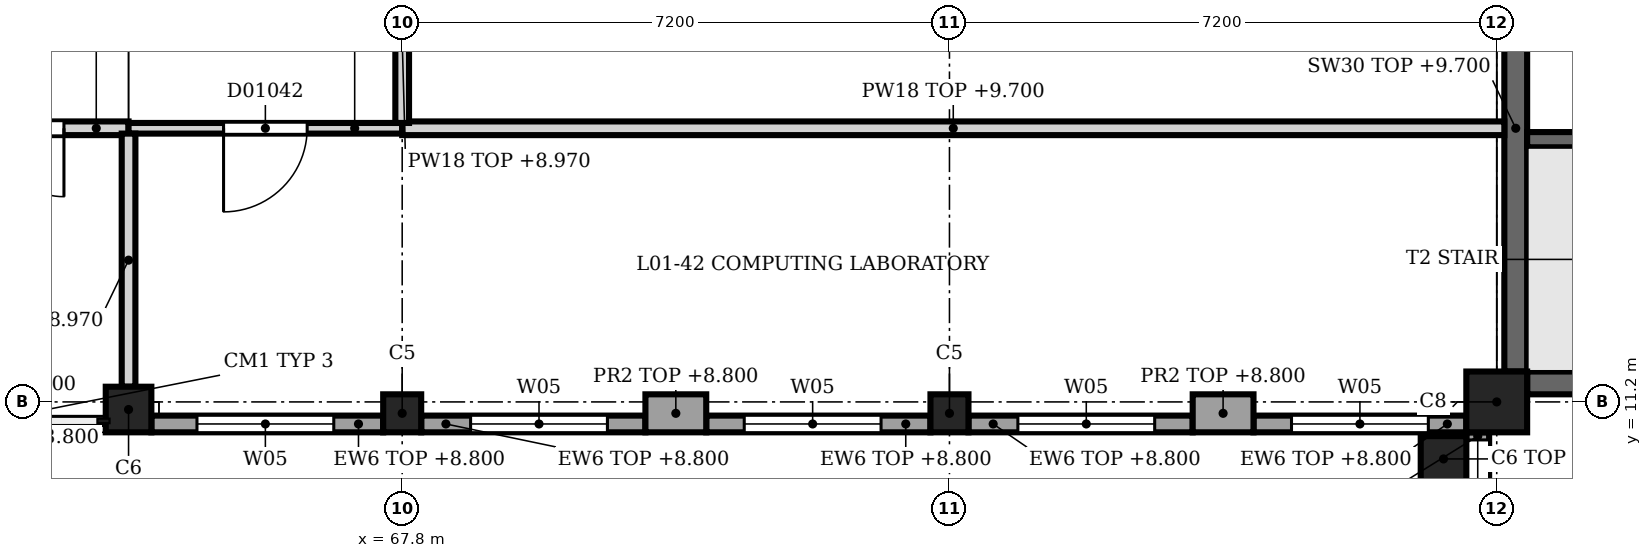
"""IFC4 building model, lengths in metres.
Left out: names, types, materials, properties, quantities, classifications, styles, units other than length and angle.
Written with IfcOpenShell. Run it as: python <this file> out.ifc"""

import sys

from ifc_helpers import new_model, si_unit, direction, frame, frame_2d, origin, origin_2d, place, context, subcontext, project, spatial, rectangle, extrude, element, fill, save


model = new_model("IFC4")
c1 = context("Model", 3, precision=1e-05, world=origin(), true_north=direction((0.0, 1.0)))
c2 = subcontext(c1, "Body", "Model", "MODEL_VIEW")
j1 = project(units=[si_unit("LENGTHUNIT", "METRE"), si_unit("PLANEANGLEUNIT", "RADIAN")], contexts=[c1])
p1 = place(None, origin())
s1 = spatial("IfcSite", under=j1, at=p1, CompositionType="ELEMENT")
p2 = place(p1, origin())
s2 = spatial("IfcBuilding", under=s1, at=p2, CompositionType="ELEMENT")
p3 = place(p2, frame((0.0, 0.0, 5.4)))
s3 = spatial("IfcBuildingStorey", under=s2, at=p3, CompositionType="ELEMENT", Elevation=5.4)
p4 = place(p3, frame((82.2, 11.2, 0.0), z_axis=(0.0, 0.0, 1.0), x_axis=(1.0, 0.0, 0.0)))
e1 = element("IfcColumn", 1, at=p4, inside=s3, PredefinedType="COLUMN", context=c2, shape_type="SweptSolid", body=[
    extrude(rectangle(XDim=0.8, YDim=0.8, at=origin_2d()), origin(), (0.0, 0.0, 1.0), 4.5),
])
p5 = place(p3, frame((64.2, 11.1, 0.0), z_axis=(0.0, 0.0, 1.0), x_axis=(1.0, 0.0, 0.0)))
e2 = element("IfcColumn", 2, at=p5, inside=s3, PredefinedType="COLUMN", context=c2, shape_type="SweptSolid", body=[
    extrude(rectangle(XDim=0.6, YDim=0.6, at=origin_2d()), origin(), (0.0, 0.0, 1.0), 4.5),
])
for number, where, z_axis, x_axis in (
    (3, (67.8, 11.05, 0.0), (0.0, 0.0, 1.0), (1.0, 0.0, 0.0)),
    (4, (75.0, 11.05, 0.0), (0.0, 0.0, 1.0), (1.0, 0.0, 0.0)),
):
    element("IfcColumn", number, at=place(p3, frame(where, z_axis=z_axis, x_axis=x_axis)), inside=s3, PredefinedType="COLUMN", context=c2, shape_type="SweptSolid", body=[
        extrude(rectangle(XDim=0.5, YDim=0.5, at=origin_2d()), origin(), (0.0, 0.0, 1.0), 4.5),
    ])
p6 = place(p3, frame((81.5, 10.45, 0.0), z_axis=(0.0, 0.0, 1.0), x_axis=(1.0, 0.0, 0.0)))
e5 = element("IfcColumn", 5, at=p6, inside=s3, PredefinedType="COLUMN", context=c2, shape_type="SweptSolid", body=[
    extrude(rectangle(XDim=0.6, YDim=0.6, at=origin_2d()), origin(), (0.0, 0.0, 1.0), 4.64),
])
p7 = place(p3, frame((81.95, 8.0, 0.0), z_axis=(0.0, 0.0, 1.0), x_axis=(0.0, 1.0, 0.0)))
e6 = element("IfcWall", 6, at=p7, inside=s3, PredefinedType="SOLIDWALL", context=c2, shape_type="SweptSolid", body=[
    extrude(rectangle(XDim=2.8, YDim=0.3, at=frame_2d((1.4, 0.0))), origin(), (0.0, 0.0, 1.0), 3.4),
])
p8 = place(p7, frame((0.1, 0.0, 0.9)))
e7 = element("IfcOpeningElement", 7, at=p8, cuts=e6, PredefinedType="OPENING", context=c2, shape_type="SweptSolid", body=[
    extrude(rectangle(XDim=2.6, YDim=2.4, at=frame_2d((1.3, 1.2))), frame((0.0, 0.16, 0.0), z_axis=(0.0, -1.0, 0.0), x_axis=(1.0, 0.0, 0.0)), (0.0, 0.0, 1.0), 0.32),
])
for number, where, z_axis, x_axis in (
    (8, (79.0, 11.05, 0.0), (0.0, 0.0, 1.0), (-1.0, 0.0, 0.0)),
    (9, (71.8, 11.05, 0.0), (0.0, 0.0, 1.0), (-1.0, 0.0, 0.0)),
):
    element("IfcWall", number, at=place(p3, frame(where, z_axis=z_axis, x_axis=x_axis)), inside=s3, PredefinedType="SOLIDWALL", context=c2, shape_type="SweptSolid", body=[
        extrude(rectangle(XDim=0.8, YDim=0.5, at=frame_2d((0.4, 0.0))), origin(), (0.0, 0.0, 1.0), 3.4),
    ])
p9 = place(p3, frame((81.8, 10.91, 0.0), z_axis=(0.0, 0.0, 1.0), x_axis=(-1.0, 0.0, 0.0)))
e10 = element("IfcWall", 10, at=p9, inside=s3, PredefinedType="SOLIDWALL", context=c2, shape_type="SweptSolid", body=[
    extrude(rectangle(XDim=2.8, YDim=0.22, at=frame_2d((1.4, 0.0))), origin(), (0.0, 0.0, 1.0), 3.4),
])
p10 = place(p9, frame((0.5, 0.0, 0.9)))
e11 = element("IfcOpeningElement", 11, at=p10, cuts=e10, PredefinedType="OPENING", context=c2, shape_type="SweptSolid", body=[
    extrude(rectangle(XDim=1.8, YDim=2.4, at=frame_2d((0.9, 1.2))), frame((0.0, 0.12, 0.0), z_axis=(0.0, -1.0, 0.0), x_axis=(1.0, 0.0, 0.0)), (0.0, 0.0, 1.0), 0.24),
])
p11 = place(p3, frame((78.2, 10.91, 0.0), z_axis=(0.0, 0.0, 1.0), x_axis=(-1.0, 0.0, 0.0)))
e12 = element("IfcWall", 12, at=p11, inside=s3, PredefinedType="SOLIDWALL", context=c2, shape_type="SweptSolid", body=[
    extrude(rectangle(XDim=2.95, YDim=0.22, at=frame_2d((1.475, 0.0))), origin(), (0.0, 0.0, 1.0), 3.4),
])
p12 = place(p11, frame((0.5, 0.0, 0.9)))
e13 = element("IfcOpeningElement", 13, at=p12, cuts=e12, PredefinedType="OPENING", context=c2, shape_type="SweptSolid", body=[
    extrude(rectangle(XDim=1.8, YDim=2.4, at=frame_2d((0.9, 1.2))), frame((0.0, 0.12, 0.0), z_axis=(0.0, -1.0, 0.0), x_axis=(1.0, 0.0, 0.0)), (0.0, 0.0, 1.0), 0.24),
])
p13 = place(p3, frame((74.75, 10.91, 0.0), z_axis=(0.0, 0.0, 1.0), x_axis=(-1.0, 0.0, 0.0)))
e14 = element("IfcWall", 14, at=p13, inside=s3, PredefinedType="SOLIDWALL", context=c2, shape_type="SweptSolid", body=[
    extrude(rectangle(XDim=2.95, YDim=0.22, at=frame_2d((1.475, 0.0))), origin(), (0.0, 0.0, 1.0), 3.4),
])
p14 = place(p13, frame((0.65, 0.0, 0.9)))
e15 = element("IfcOpeningElement", 15, at=p14, cuts=e14, PredefinedType="OPENING", context=c2, shape_type="SweptSolid", body=[
    extrude(rectangle(XDim=1.8, YDim=2.4, at=frame_2d((0.9, 1.2))), frame((0.0, 0.12, 0.0), z_axis=(0.0, -1.0, 0.0), x_axis=(1.0, 0.0, 0.0)), (0.0, 0.0, 1.0), 0.24),
])
p15 = place(p3, frame((71.0, 10.91, 0.0), z_axis=(0.0, 0.0, 1.0), x_axis=(-1.0, 0.0, 0.0)))
e16 = element("IfcWall", 16, at=p15, inside=s3, PredefinedType="SOLIDWALL", context=c2, shape_type="SweptSolid", body=[
    extrude(rectangle(XDim=2.95, YDim=0.22, at=frame_2d((1.475, 0.0))), origin(), (0.0, 0.0, 1.0), 3.4),
])
p16 = place(p15, frame((0.5, 0.0, 0.9)))
e17 = element("IfcOpeningElement", 17, at=p16, cuts=e16, PredefinedType="OPENING", context=c2, shape_type="SweptSolid", body=[
    extrude(rectangle(XDim=1.8, YDim=2.4, at=frame_2d((0.9, 1.2))), frame((0.0, 0.12, 0.0), z_axis=(0.0, -1.0, 0.0), x_axis=(1.0, 0.0, 0.0)), (0.0, 0.0, 1.0), 0.24),
])
p17 = place(p3, frame((67.55, 10.91, 0.0), z_axis=(0.0, 0.0, 1.0), x_axis=(-1.0, 0.0, 0.0)))
e18 = element("IfcWall", 18, at=p17, inside=s3, PredefinedType="SOLIDWALL", context=c2, shape_type="SweptSolid", body=[
    extrude(rectangle(XDim=3.05, YDim=0.22, at=frame_2d((1.525, 0.0))), origin(), (0.0, 0.0, 1.0), 3.4),
])
p18 = place(p17, frame((0.65, 0.0, 0.9)))
e19 = element("IfcOpeningElement", 19, at=p18, cuts=e18, PredefinedType="OPENING", context=c2, shape_type="SweptSolid", body=[
    extrude(rectangle(XDim=1.8, YDim=2.4, at=frame_2d((0.9, 1.2))), frame((0.0, 0.12, 0.0), z_axis=(0.0, -1.0, 0.0), x_axis=(1.0, 0.0, 0.0)), (0.0, 0.0, 1.0), 0.24),
])
for number, where, z_axis, x_axis in (
    (20, (82.45, 11.6, 0.0), (0.0, 0.0, 1.0), (0.0, 1.0, 0.0)),
    (21, (82.6, 11.45, 0.0), (0.0, 0.0, 1.0), (1.0, 0.0, 0.0)),
):
    element("IfcWall", number, at=place(p3, frame(where, z_axis=z_axis, x_axis=x_axis)), inside=s3, PredefinedType="SHEAR", context=c2, shape_type="SweptSolid", body=[
        extrude(rectangle(XDim=6.4, YDim=0.3, at=frame_2d((3.2, 0.0))), origin(), (0.0, 0.0, 1.0), 4.3),
    ])
p19 = place(p3, frame((89.0, 14.65, 0.0), z_axis=(0.0, 0.0, 1.0), x_axis=(-1.0, 0.0, 0.0)))
e22 = element("IfcWall", 22, at=p19, inside=s3, PredefinedType="SHEAR", context=c2, shape_type="SweptSolid", body=[
    extrude(rectangle(XDim=6.4, YDim=0.2, at=frame_2d((3.2, 0.0))), origin(), (0.0, 0.0, 1.0), 4.3),
])
p20 = place(p19, frame((0.1, 0.0, 0.0)))
e23 = element("IfcOpeningElement", 23, at=p20, cuts=e22, PredefinedType="OPENING", context=c2, shape_type="SweptSolid", body=[
    extrude(rectangle(XDim=1.0, YDim=2.1, at=frame_2d((0.5, 1.05))), frame((0.0, 0.11, 0.0), z_axis=(0.0, -1.0, 0.0), x_axis=(1.0, 0.0, 0.0)), (0.0, 0.0, 1.0), 0.22),
])
p21 = place(p3, frame((61.225, 14.8, 0.0), z_axis=(0.0, 0.0, 1.0), x_axis=(1.0, 0.0, 0.0)))
e24 = element("IfcWall", 24, at=p21, inside=s3, PredefinedType="PARTITIONING", context=c2, shape_type="SweptSolid", body=[
    extrude(rectangle(XDim=2.975, YDim=0.18, at=frame_2d((1.487, 0.0))), origin(), (0.0, 0.0, 1.0), 4.3),
])
p22 = place(p21, frame((0.325, 0.0, 0.0)))
e25 = element("IfcOpeningElement", 25, at=p22, cuts=e24, PredefinedType="OPENING", context=c2, shape_type="SweptSolid", body=[
    extrude(rectangle(XDim=1.8, YDim=2.3, at=frame_2d((0.9, 1.15))), frame((0.0, 0.1, 0.0), z_axis=(0.0, -1.0, 0.0), x_axis=(1.0, 0.0, 0.0)), (0.0, 0.0, 1.0), 0.2),
])
p23 = place(p3, frame((67.8, 14.8, 0.0), z_axis=(0.0, 0.0, 1.0), x_axis=(-1.0, 0.0, 0.0)))
e26 = element("IfcWall", 26, at=p23, inside=s3, PredefinedType="PARTITIONING", context=c2, shape_type="SweptSolid", body=[
    extrude(rectangle(XDim=3.6, YDim=0.14, at=frame_2d((1.8, 0.0))), origin(), (0.0, 0.0, 1.0), 4.3),
])
p24 = place(p23, frame((1.25, 0.0, 0.0)))
e27 = element("IfcOpeningElement", 27, at=p24, cuts=e26, PredefinedType="OPENING", context=c2, shape_type="SweptSolid", body=[
    extrude(rectangle(XDim=1.1, YDim=2.2, at=frame_2d((0.55, 1.1))), frame((0.0, 0.08, 0.0), z_axis=(0.0, -1.0, 0.0), x_axis=(1.0, 0.0, 0.0)), (0.0, 0.0, 1.0), 0.16),
])
p25 = place(p3, frame((67.8, 14.8, 0.0), z_axis=(0.0, 0.0, 1.0), x_axis=(1.0, 0.0, 0.0)))
e28 = element("IfcWall", 28, at=p25, inside=s3, PredefinedType="PARTITIONING", context=c2, shape_type="SweptSolid", body=[
    extrude(rectangle(XDim=14.5, YDim=0.18, at=frame_2d((7.25, 0.0))), origin(), (0.0, 0.0, 1.0), 4.3),
])
p26 = place(p3, frame((64.2, 11.4, 0.0), z_axis=(0.0, 0.0, 1.0), x_axis=(0.0, 1.0, 0.0)))
e29 = element("IfcWall", 29, at=p26, inside=s3, PredefinedType="PARTITIONING", context=c2, shape_type="SweptSolid", body=[
    extrude(rectangle(XDim=3.33, YDim=0.18, at=frame_2d((1.665, 0.0))), origin(), (0.0, 0.0, 1.0), 3.57),
])
p27 = place(p3, frame((67.8, 18.15, 0.0), z_axis=(0.0, 0.0, 1.0), x_axis=(0.0, -1.0, 0.0)))
e30 = element("IfcWall", 30, at=p27, inside=s3, PredefinedType="PARTITIONING", context=c2, shape_type="SweptSolid", body=[
    extrude(rectangle(XDim=3.28, YDim=0.18, at=frame_2d((1.64, 0.0))), origin(), (0.0, 0.0, 1.0), 3.57),
])
p28 = place(p27, origin())
e31 = element("IfcOpeningElement", 31, at=p28, cuts=e30, PredefinedType="OPENING", context=c2, shape_type="SweptSolid", body=[
    extrude(rectangle(XDim=1.1, YDim=2.3, at=frame_2d((0.55, 1.15))), frame((0.0, 0.1, 0.0), z_axis=(0.0, -1.0, 0.0), x_axis=(1.0, 0.0, 0.0)), (0.0, 0.0, 1.0), 0.2),
])
p29 = place(p8, origin())
e32 = element("IfcWindow", 32, at=p29, inside=s3, PartitioningType="SINGLE_PANEL", PredefinedType="WINDOW", context=c2, shape_type="SweptSolid", body=[
    extrude(rectangle(XDim=2.6, YDim=2.4, at=frame_2d((1.3, 1.2))), frame((0.0, 0.03, 0.0), z_axis=(0.0, -1.0, 0.0), x_axis=(1.0, 0.0, 0.0)), (0.0, 0.0, 1.0), 0.06),
])
fill(e7, e32)
p30 = place(p10, origin())
e33 = element("IfcWindow", 33, at=p30, inside=s3, PartitioningType="SINGLE_PANEL", PredefinedType="WINDOW", context=c2, shape_type="SweptSolid", body=[
    extrude(rectangle(XDim=1.8, YDim=2.4, at=frame_2d((0.9, 1.2))), frame((0.0, 0.03, 0.0), z_axis=(0.0, -1.0, 0.0), x_axis=(1.0, 0.0, 0.0)), (0.0, 0.0, 1.0), 0.06),
])
fill(e11, e33)
p31 = place(p12, origin())
e34 = element("IfcWindow", 34, at=p31, inside=s3, PartitioningType="SINGLE_PANEL", PredefinedType="WINDOW", context=c2, shape_type="SweptSolid", body=[
    extrude(rectangle(XDim=1.8, YDim=2.4, at=frame_2d((0.9, 1.2))), frame((0.0, 0.03, 0.0), z_axis=(0.0, -1.0, 0.0), x_axis=(1.0, 0.0, 0.0)), (0.0, 0.0, 1.0), 0.06),
])
fill(e13, e34)
p32 = place(p14, origin())
e35 = element("IfcWindow", 35, at=p32, inside=s3, PartitioningType="SINGLE_PANEL", PredefinedType="WINDOW", context=c2, shape_type="SweptSolid", body=[
    extrude(rectangle(XDim=1.8, YDim=2.4, at=frame_2d((0.9, 1.2))), frame((0.0, 0.03, 0.0), z_axis=(0.0, -1.0, 0.0), x_axis=(1.0, 0.0, 0.0)), (0.0, 0.0, 1.0), 0.06),
])
fill(e15, e35)
p33 = place(p16, origin())
e36 = element("IfcWindow", 36, at=p33, inside=s3, PartitioningType="SINGLE_PANEL", PredefinedType="WINDOW", context=c2, shape_type="SweptSolid", body=[
    extrude(rectangle(XDim=1.8, YDim=2.4, at=frame_2d((0.9, 1.2))), frame((0.0, 0.03, 0.0), z_axis=(0.0, -1.0, 0.0), x_axis=(1.0, 0.0, 0.0)), (0.0, 0.0, 1.0), 0.06),
])
fill(e17, e36)
p34 = place(p18, origin())
e37 = element("IfcWindow", 37, at=p34, inside=s3, PartitioningType="SINGLE_PANEL", PredefinedType="WINDOW", context=c2, shape_type="SweptSolid", body=[
    extrude(rectangle(XDim=1.8, YDim=2.4, at=frame_2d((0.9, 1.2))), frame((0.0, 0.03, 0.0), z_axis=(0.0, -1.0, 0.0), x_axis=(1.0, 0.0, 0.0)), (0.0, 0.0, 1.0), 0.06),
])
fill(e19, e37)
p35 = place(p22, origin())
e38 = element("IfcDoor", 38, at=p35, inside=s3, OperationType="SINGLE_SWING_LEFT", PredefinedType="DOOR", context=c2, shape_type="SweptSolid", body=[
    extrude(rectangle(XDim=1.8, YDim=2.3, at=frame_2d((0.9, 1.15))), frame((0.0, 0.025, 0.0), z_axis=(0.0, -1.0, 0.0), x_axis=(1.0, 0.0, 0.0)), (0.0, 0.0, 1.0), 0.05),
])
fill(e25, e38)
p36 = place(p24, origin())
e39 = element("IfcDoor", 39, at=p36, inside=s3, OperationType="SINGLE_SWING_LEFT", PredefinedType="DOOR", context=c2, shape_type="SweptSolid", body=[
    extrude(rectangle(XDim=1.1, YDim=2.2, at=frame_2d((0.55, 1.1))), frame((0.0, 0.025, 0.0), z_axis=(0.0, -1.0, 0.0), x_axis=(1.0, 0.0, 0.0)), (0.0, 0.0, 1.0), 0.05),
])
fill(e27, e39)
save(model, sys.argv[1])
